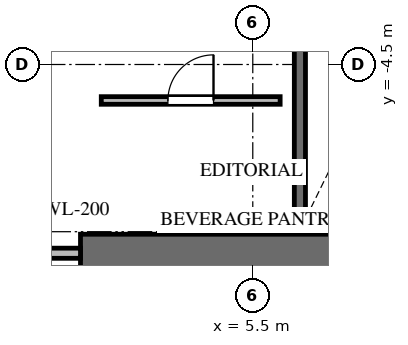
"""IFC4 building model, lengths in metres.
Left out: names, types, materials, properties, quantities, classifications, styles, units other than length and angle.
Written with IfcOpenShell. Run it as: python <this file> out.ifc"""

import sys

from ifc_helpers import new_model, si_unit, direction, frame, frame_2d, origin, place, context, subcontext, project, spatial, rectangle, extrude, source, transform, mapped, element, fill, save


model = new_model("IFC4")
c1 = context("Model", 3, precision=1e-05, world=origin(), true_north=direction((0.0, 1.0)))
c2 = subcontext(c1, "Body", "Model", "MODEL_VIEW")
j1 = project(units=[si_unit("LENGTHUNIT", "METRE"), si_unit("PLANEANGLEUNIT", "RADIAN")], contexts=[c1])
p1 = place(None, origin())
s1 = spatial("IfcSite", under=j1, at=p1, CompositionType="ELEMENT")
p2 = place(p1, origin())
s2 = spatial("IfcBuilding", under=s1, at=p2, CompositionType="ELEMENT")
p3 = place(p2, frame((0.0, 0.0, 140.1)))
s3 = spatial("IfcBuildingStorey", under=s2, at=p3, CompositionType="ELEMENT", Elevation=140.1)
p4 = place(p3, frame((2.1, -8.225, 0.0), z_axis=(0.0, 0.0, 1.0), x_axis=(1.0, 0.0, 0.0)))
e1 = element("IfcWall", 1, at=p4, inside=s3, PredefinedType="SHEAR", context=c2, shape_type="SweptSolid", body=[
    extrude(rectangle(XDim=7.75, YDim=0.75, at=frame_2d((3.875, 0.0))), origin(), (0.0, 0.0, 1.0), 3.0),
])
p5 = place(p3, frame((6.43, 0.12, -0.24), z_axis=(0.0, 0.0, 1.0), x_axis=(0.0, -1.0, 0.0)))
e2 = element("IfcWall", 2, at=p5, inside=s3, PredefinedType="SHEAR", context=c2, shape_type="SweptSolid", body=[
    extrude(rectangle(XDim=7.89, YDim=0.22, at=frame_2d((3.945, 0.0))), origin(), (0.0, 0.0, 1.0), 3.0),
])
p6 = place(p5, frame((0.52, 0.0, 0.0)))
e3 = element("IfcOpeningElement", 3, at=p6, cuts=e2, PredefinedType="OPENING", context=c2, shape_type="SweptSolid", body=[
    extrude(rectangle(XDim=1.05, YDim=2.15, at=frame_2d((0.525, 1.075))), frame((0.0, 0.12, 0.0), z_axis=(0.0, -1.0, 0.0), x_axis=(1.0, 0.0, 0.0)), (0.0, 0.0, 1.0), 0.24),
])
p7 = place(p3, frame((6.54, -7.66, -0.24), z_axis=(0.0, 0.0, 1.0), x_axis=(1.0, 0.0, 0.0)))
e4 = element("IfcWall", 4, at=p7, inside=s3, PredefinedType="SHEAR", context=c2, shape_type="SweptSolid", body=[
    extrude(rectangle(XDim=2.96, YDim=0.22, at=frame_2d((1.48, 0.0))), origin(), (0.0, 0.0, 1.0), 3.0),
])
p8 = place(p3, frame((-2.1, -8.225, 0.0), z_axis=(0.0, 0.0, 1.0), x_axis=(1.0, 0.0, 0.0)))
e5 = element("IfcWall", 5, at=p8, inside=s3, PredefinedType="SOLIDWALL", context=c2, shape_type="SweptSolid", body=[
    extrude(rectangle(XDim=4.2, YDim=0.2, at=frame_2d((2.1, 0.0))), origin(), (0.0, 0.0, 1.0), 2.745),
])
p9 = place(p8, frame((1.2, 0.0, 0.0)))
e6 = element("IfcOpeningElement", 6, at=p9, cuts=e5, PredefinedType="OPENING", context=c2, shape_type="SweptSolid", body=[
    extrude(rectangle(XDim=1.8, YDim=2.15, at=frame_2d((0.9, 1.075))), frame((0.0, 0.11, 0.0), z_axis=(0.0, -1.0, 0.0), x_axis=(1.0, 0.0, 0.0)), (0.0, 0.0, 1.0), 0.22),
])
p10 = place(p3, frame((2.51, -5.21, 0.0), z_axis=(0.0, 0.0, 1.0), x_axis=(1.0, 0.0, 0.0)))
e7 = element("IfcWall", 7, at=p10, inside=s3, PredefinedType="PARTITIONING", context=c2, shape_type="SweptSolid", body=[
    extrude(rectangle(XDim=3.53, YDim=0.15, at=frame_2d((1.765, 0.0))), origin(), (0.0, 0.0, 1.0), 2.745),
])
p11 = place(p10, frame((1.315, 0.0, 0.0)))
e8 = element("IfcOpeningElement", 8, at=p11, cuts=e7, PredefinedType="OPENING", context=c2, shape_type="SweptSolid", body=[
    extrude(rectangle(XDim=0.9, YDim=2.05, at=frame_2d((0.45, 1.025))), frame((0.0, 0.085, 0.0), z_axis=(0.0, -1.0, 0.0), x_axis=(1.0, 0.0, 0.0)), (0.0, 0.0, 1.0), 0.17),
])
m1 = source(origin(), c2, "Body", "SweptSolid", [
    extrude(rectangle(XDim=0.9, YDim=2.05, at=frame_2d((0.45, 1.025))), frame((0.0, 0.025, 0.0), z_axis=(0.0, -1.0, 0.0), x_axis=(1.0, 0.0, 0.0)), (0.0, 0.0, 1.0), 0.05),
])
p12 = place(p11, origin())
e9 = element("IfcDoor", 9, at=p12, inside=s3, OperationType="SINGLE_SWING_RIGHT", PredefinedType="DOOR", context=c2, shape_type="MappedRepresentation", body=[
    mapped(m1, transform((0.0, 0.0, 0.0), x_axis=(1.0, 0.0, 0.0), y_axis=(0.0, 1.0, 0.0), z_axis=(0.0, 0.0, 1.0), scale=1.0)),
])
fill(e8, e9)
save(model, sys.argv[1])
